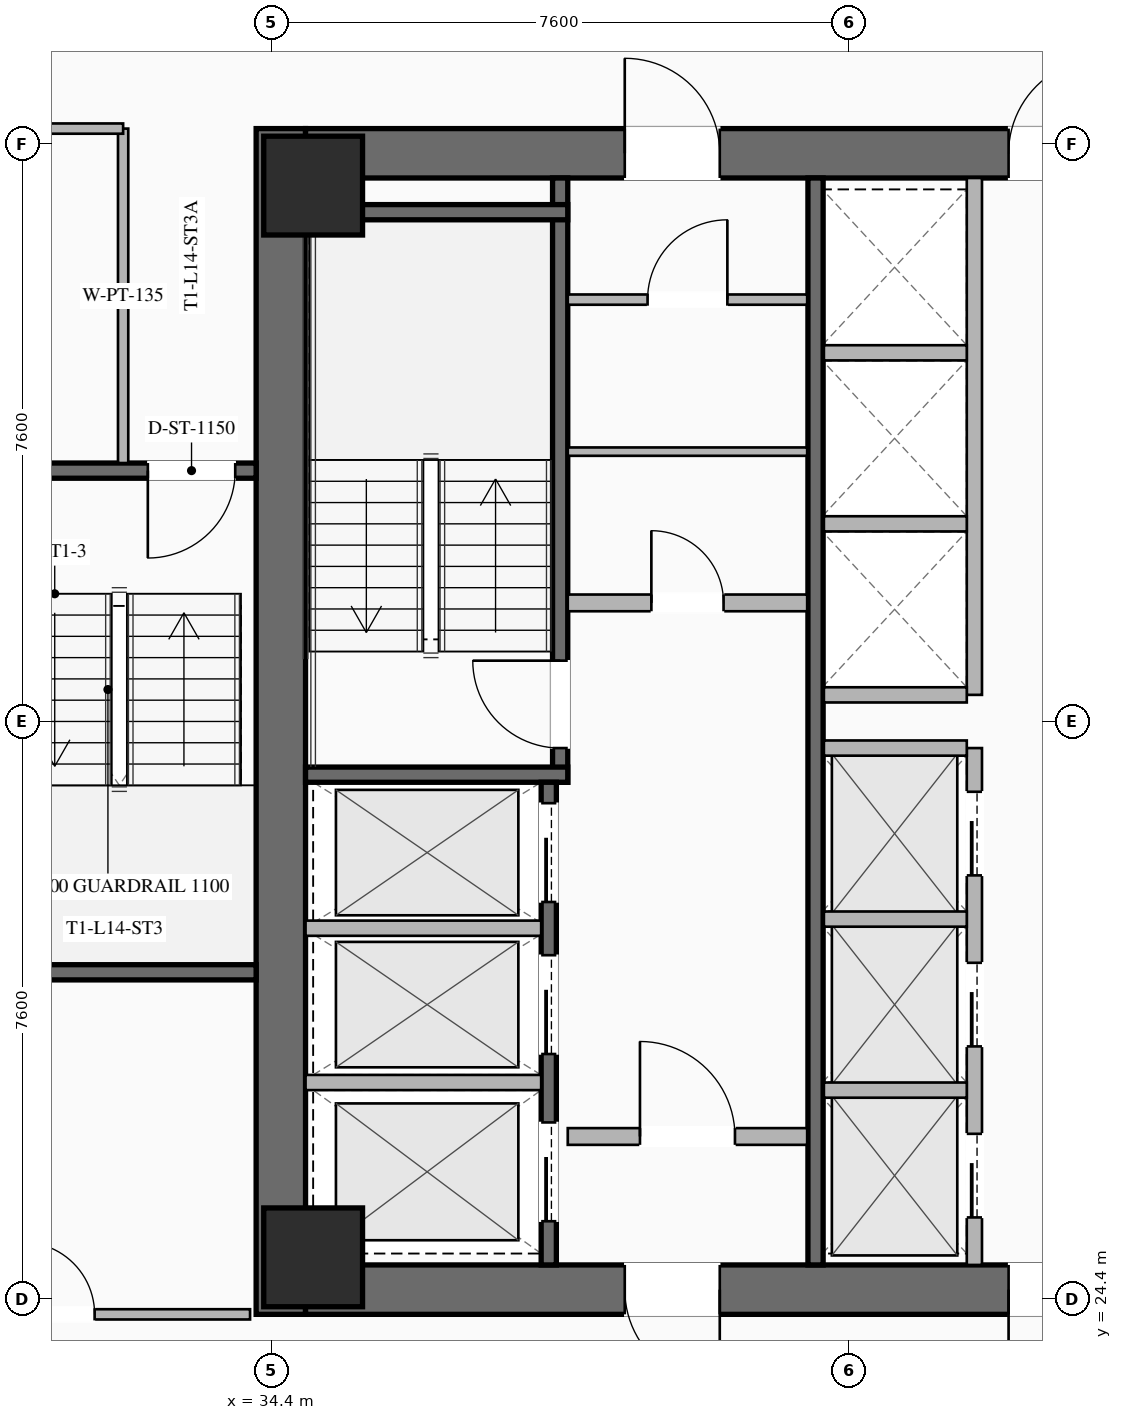
"""IFC4 building model, lengths in metres.
Left out: names, types, materials, properties, quantities, classifications, styles, units other than length and angle.
Written with IfcOpenShell. Run it as: python <this file> out.ifc"""

import sys

from ifc_helpers import new_model, si_unit, direction, frame, frame_2d, origin, origin_2d, place, context, subcontext, project, spatial, rectangle, hollow_rectangle, extrude, element, fill, save


model = new_model("IFC4")
c1 = context("Model", 3, precision=1e-05, world=origin(), true_north=direction((0.0, 1.0)))
c2 = subcontext(c1, "Body", "Model", "MODEL_VIEW")
j1 = project(units=[si_unit("LENGTHUNIT", "METRE"), si_unit("PLANEANGLEUNIT", "RADIAN")], contexts=[c1])
p1 = place(None, origin())
s1 = spatial("IfcSite", under=j1, at=p1, CompositionType="ELEMENT")
p2 = place(p1, origin())
s2 = spatial("IfcBuilding", under=s1, at=p2, CompositionType="ELEMENT")
p3 = place(p2, frame((0.0, 0.0, 56.55)))
s3 = spatial("IfcBuildingStorey", under=s2, at=p3, CompositionType="ELEMENT", Elevation=56.55)
p4 = place(p3, frame((34.525, 24.2, 0.0), z_axis=(0.0, 0.0, 1.0), x_axis=(0.0, 1.0, 0.0)))
e1 = element("IfcWall", 1, at=p4, inside=s3, PredefinedType="SHEAR", context=c2, shape_type="SweptSolid", body=[
    extrude(rectangle(XDim=15.6, YDim=0.65, at=frame_2d((7.8, 0.0))), origin(), (0.0, 0.0, 1.0), 3.55),
])
p5 = place(p3, frame((49.15, 24.525, 0.0), z_axis=(0.0, 0.0, 1.0), x_axis=(-1.0, 0.0, 0.0)))
e2 = element("IfcWall", 2, at=p5, inside=s3, PredefinedType="SHEAR", context=c2, shape_type="SweptSolid", body=[
    extrude(rectangle(XDim=14.3, YDim=0.65, at=frame_2d((7.15, 0.0))), origin(), (0.0, 0.0, 1.0), 3.55),
])
p6 = place(p5, frame((8.85, 0.0, 0.0)))
e3 = element("IfcOpeningElement", 3, at=p6, cuts=e2, PredefinedType="OPENING", context=c2, shape_type="SweptSolid", body=[
    extrude(rectangle(XDim=1.25, YDim=2.25, at=frame_2d((0.625, 1.125))), frame((0.0, 0.335, 0.0), z_axis=(0.0, -1.0, 0.0), x_axis=(1.0, 0.0, 0.0)), (0.0, 0.0, 1.0), 0.67),
])
p7 = place(p5, frame((3.8, 0.0, 0.0)))
e4 = element("IfcOpeningElement", 4, at=p7, cuts=e2, PredefinedType="OPENING", context=c2, shape_type="SweptSolid", body=[
    extrude(rectangle(XDim=1.25, YDim=2.25, at=frame_2d((0.625, 1.125))), frame((0.0, 0.335, 0.0), z_axis=(0.0, -1.0, 0.0), x_axis=(1.0, 0.0, 0.0)), (0.0, 0.0, 1.0), 0.67),
])
p8 = place(p3, frame((34.85, 39.475, 0.0), z_axis=(0.0, 0.0, 1.0), x_axis=(1.0, 0.0, 0.0)))
e5 = element("IfcWall", 5, at=p8, inside=s3, PredefinedType="SHEAR", context=c2, shape_type="SweptSolid", body=[
    extrude(rectangle(XDim=14.3, YDim=0.65, at=frame_2d((7.15, 0.0))), origin(), (0.0, 0.0, 1.0), 3.55),
])
p9 = place(p8, frame((4.2, 0.0, 0.0)))
e6 = element("IfcOpeningElement", 6, at=p9, cuts=e5, PredefinedType="OPENING", context=c2, shape_type="SweptSolid", body=[
    extrude(rectangle(XDim=1.25, YDim=2.25, at=frame_2d((0.625, 1.125))), frame((0.0, 0.335, 0.0), z_axis=(0.0, -1.0, 0.0), x_axis=(1.0, 0.0, 0.0)), (0.0, 0.0, 1.0), 0.67),
])
p10 = place(p8, frame((9.25, 0.0, 0.0)))
e7 = element("IfcOpeningElement", 7, at=p10, cuts=e5, PredefinedType="OPENING", context=c2, shape_type="SweptSolid", body=[
    extrude(rectangle(XDim=1.25, YDim=2.25, at=frame_2d((0.625, 1.125))), frame((0.0, 0.335, 0.0), z_axis=(0.0, -1.0, 0.0), x_axis=(1.0, 0.0, 0.0)), (0.0, 0.0, 1.0), 0.67),
])
for number, where, z_axis, x_axis in (
    (8, (34.95, 24.95, 0.0), (0.0, 0.0, 1.0), (1.0, 0.0, 0.0)),
    (9, (34.95, 39.05, 0.0), (0.0, 0.0, 1.0), (1.0, 0.0, 0.0)),
):
    element("IfcColumn", number, at=place(p3, frame(where, z_axis=z_axis, x_axis=x_axis)), inside=s3, PredefinedType="COLUMN", context=c2, shape_type="SweptSolid", body=[
        extrude(hollow_rectangle(XDim=1.3, YDim=1.3, WallThickness=0.05, at=origin_2d()), origin(), (0.0, 0.0, 1.0), 3.35),
    ])
p11 = place(p3, frame((38.2, 31.2, 0.0), z_axis=(0.0, 0.0, 1.0), x_axis=(0.0, 1.0, 0.0)))
e10 = element("IfcWall", 10, at=p11, inside=s3, PredefinedType="SHEAR", context=c2, shape_type="SweptSolid", body=[
    extrude(rectangle(XDim=7.95, YDim=0.2, at=frame_2d((3.975, 0.0))), origin(), (0.0, 0.0, 1.0), 3.35),
])
p12 = place(p11, frame((0.45, 0.0, 0.0)))
e11 = element("IfcOpeningElement", 11, at=p12, cuts=e10, PredefinedType="OPENING", context=c2, shape_type="SweptSolid", body=[
    extrude(rectangle(XDim=1.15, YDim=2.2, at=frame_2d((0.575, 1.1))), frame((0.0, 0.11, 0.0), z_axis=(0.0, -1.0, 0.0), x_axis=(1.0, 0.0, 0.0)), (0.0, 0.0, 1.0), 0.22),
])
for number, where, z_axis, x_axis in (
    (12, (34.85, 31.3, 0.0), (0.0, 0.0, 1.0), (1.0, 0.0, 0.0)),
    (13, (34.85, 38.7, 0.0), (0.0, 0.0, 1.0), (1.0, 0.0, 0.0)),
):
    element("IfcWall", number, at=place(p3, frame(where, z_axis=z_axis, x_axis=x_axis)), inside=s3, PredefinedType="SHEAR", context=c2, shape_type="SweptSolid", body=[
        extrude(rectangle(XDim=3.45, YDim=0.2, at=frame_2d((1.725, 0.0))), origin(), (0.0, 0.0, 1.0), 3.35),
    ])
p13 = place(p3, frame((41.56, 24.85, 0.0), z_axis=(0.0, 0.0, 1.0), x_axis=(0.0, 1.0, 0.0)))
e14 = element("IfcWall", 14, at=p13, inside=s3, PredefinedType="SHEAR", context=c2, shape_type="SweptSolid", body=[
    extrude(rectangle(XDim=14.3, YDim=0.2, at=frame_2d((7.15, 0.0))), origin(), (0.0, 0.0, 1.0), 3.35),
])
p14 = place(p3, frame((38.3, 33.56, 0.0), z_axis=(0.0, 0.0, 1.0), x_axis=(1.0, 0.0, 0.0)))
e15 = element("IfcWall", 15, at=p14, inside=s3, PredefinedType="SOLIDWALL", context=c2, shape_type="SweptSolid", body=[
    extrude(rectangle(XDim=3.15, YDim=0.22, at=frame_2d((1.575, 0.0))), origin(), (0.0, 0.0, 1.0), 2.703),
])
p15 = place(p14, frame((1.1, 0.0, 0.0)))
e16 = element("IfcOpeningElement", 16, at=p15, cuts=e15, PredefinedType="OPENING", context=c2, shape_type="SweptSolid", body=[
    extrude(rectangle(XDim=0.95, YDim=2.05, at=frame_2d((0.475, 1.025))), frame((0.0, 0.12, 0.0), z_axis=(0.0, -1.0, 0.0), x_axis=(1.0, 0.0, 0.0)), (0.0, 0.0, 1.0), 0.24),
])
p16 = place(p3, frame((38.3, 26.54, 0.0), z_axis=(0.0, 0.0, 1.0), x_axis=(1.0, 0.0, 0.0)))
e17 = element("IfcWall", 17, at=p16, inside=s3, PredefinedType="SOLIDWALL", context=c2, shape_type="SweptSolid", body=[
    extrude(rectangle(XDim=3.15, YDim=0.22, at=frame_2d((1.575, 0.0))), origin(), (0.0, 0.0, 1.0), 2.703),
])
p17 = place(p16, frame((0.95, 0.0, 0.0)))
e18 = element("IfcOpeningElement", 18, at=p17, cuts=e17, PredefinedType="OPENING", context=c2, shape_type="SweptSolid", body=[
    extrude(rectangle(XDim=1.25, YDim=2.25, at=frame_2d((0.625, 1.125))), frame((0.0, 0.12, 0.0), z_axis=(0.0, -1.0, 0.0), x_axis=(1.0, 0.0, 0.0)), (0.0, 0.0, 1.0), 0.24),
])
p18 = place(p3, frame((38.05, 24.85, 0.0), z_axis=(0.0, 0.0, 1.0), x_axis=(0.0, 1.0, 0.0)))
e19 = element("IfcWall", 19, at=p18, inside=s3, PredefinedType="SHEAR", context=c2, shape_type="SweptSolid", body=[
    extrude(rectangle(XDim=6.35, YDim=0.2, at=frame_2d((3.175, 0.0))), origin(), (0.0, 0.0, 1.0), 3.35),
])
p19 = place(p18, frame((4.775, 0.0, 0.0)))
e20 = element("IfcOpeningElement", 20, at=p19, cuts=e19, PredefinedType="OPENING", context=c2, shape_type="SweptSolid", body=[
    extrude(rectangle(XDim=1.3, YDim=2.25, at=frame_2d((0.65, 1.125))), frame((0.0, 0.11, 0.0), z_axis=(0.0, -1.0, 0.0), x_axis=(1.0, 0.0, 0.0)), (0.0, 0.0, 1.0), 0.22),
])
p20 = place(p18, frame((2.775, 0.0, 0.0)))
e21 = element("IfcOpeningElement", 21, at=p20, cuts=e19, PredefinedType="OPENING", context=c2, shape_type="SweptSolid", body=[
    extrude(rectangle(XDim=1.3, YDim=2.25, at=frame_2d((0.65, 1.125))), frame((0.0, 0.11, 0.0), z_axis=(0.0, -1.0, 0.0), x_axis=(1.0, 0.0, 0.0)), (0.0, 0.0, 1.0), 0.22),
])
p21 = place(p18, frame((0.575, 0.0, 0.0)))
e22 = element("IfcOpeningElement", 22, at=p21, cuts=e19, PredefinedType="OPENING", context=c2, shape_type="SweptSolid", body=[
    extrude(rectangle(XDim=1.3, YDim=2.25, at=frame_2d((0.65, 1.125))), frame((0.0, 0.11, 0.0), z_axis=(0.0, -1.0, 0.0), x_axis=(1.0, 0.0, 0.0)), (0.0, 0.0, 1.0), 0.22),
])
for number, where, z_axis, x_axis in (
    (23, (34.85, 27.25, 0.0), (0.0, 0.0, 1.0), (1.0, 0.0, 0.0)),
    (24, (34.85, 29.28, 0.0), (0.0, 0.0, 1.0), (1.0, 0.0, 0.0)),
):
    element("IfcWall", number, at=place(p3, frame(where, z_axis=z_axis, x_axis=x_axis)), inside=s3, PredefinedType="SOLIDWALL", context=c2, shape_type="SweptSolid", body=[
        extrude(rectangle(XDim=3.1, YDim=0.2, at=frame_2d((1.55, 0.0))), origin(), (0.0, 0.0, 1.0), 3.35),
    ])
p22 = place(p3, frame((38.3, 37.55, 0.0), z_axis=(0.0, 0.0, 1.0), x_axis=(1.0, 0.0, 0.0)))
e25 = element("IfcWall", 25, at=p22, inside=s3, PredefinedType="PARTITIONING", context=c2, shape_type="SweptSolid", body=[
    extrude(rectangle(XDim=3.15, YDim=0.135, at=frame_2d((1.575, 0.0))), origin(), (0.0, 0.0, 1.0), 2.703),
])
p23 = place(p22, frame((1.05, 0.0, 0.0)))
e26 = element("IfcOpeningElement", 26, at=p23, cuts=e25, PredefinedType="OPENING", context=c2, shape_type="SweptSolid", body=[
    extrude(rectangle(XDim=1.05, YDim=2.2, at=frame_2d((0.525, 1.1))), frame((0.0, 0.077, 0.0), z_axis=(0.0, -1.0, 0.0), x_axis=(1.0, 0.0, 0.0)), (0.0, 0.0, 1.0), 0.155),
])
p24 = place(p3, frame((38.3, 35.55, 0.0), z_axis=(0.0, 0.0, 1.0), x_axis=(1.0, 0.0, 0.0)))
e27 = element("IfcWall", 27, at=p24, inside=s3, PredefinedType="PARTITIONING", context=c2, shape_type="SweptSolid", body=[
    extrude(rectangle(XDim=3.15, YDim=0.11, at=frame_2d((1.575, 0.0))), origin(), (0.0, 0.0, 1.0), 2.703),
])
p25 = place(p3, frame((43.65, 24.85, 0.0), z_axis=(0.0, 0.0, 1.0), x_axis=(0.0, 1.0, 0.0)))
e28 = element("IfcWall", 28, at=p25, inside=s3, PredefinedType="SOLIDWALL", context=c2, shape_type="SweptSolid", body=[
    extrude(rectangle(XDim=6.8, YDim=0.2, at=frame_2d((3.4, 0.0))), origin(), (0.0, 0.0, 1.0), 3.35),
])
p26 = place(p25, frame((0.625, 0.0, 0.0)))
e29 = element("IfcOpeningElement", 29, at=p26, cuts=e28, PredefinedType="OPENING", context=c2, shape_type="SweptSolid", body=[
    extrude(rectangle(XDim=1.1, YDim=2.2, at=frame_2d((0.55, 1.1))), frame((0.0, 0.11, 0.0), z_axis=(0.0, -1.0, 0.0), x_axis=(1.0, 0.0, 0.0)), (0.0, 0.0, 1.0), 0.22),
])
p27 = place(p25, frame((2.875, 0.0, 0.0)))
e30 = element("IfcOpeningElement", 30, at=p27, cuts=e28, PredefinedType="OPENING", context=c2, shape_type="SweptSolid", body=[
    extrude(rectangle(XDim=1.1, YDim=2.2, at=frame_2d((0.55, 1.1))), frame((0.0, 0.11, 0.0), z_axis=(0.0, -1.0, 0.0), x_axis=(1.0, 0.0, 0.0)), (0.0, 0.0, 1.0), 0.22),
])
p28 = place(p25, frame((5.125, 0.0, 0.0)))
e31 = element("IfcOpeningElement", 31, at=p28, cuts=e28, PredefinedType="OPENING", context=c2, shape_type="SweptSolid", body=[
    extrude(rectangle(XDim=1.1, YDim=2.2, at=frame_2d((0.55, 1.1))), frame((0.0, 0.11, 0.0), z_axis=(0.0, -1.0, 0.0), x_axis=(1.0, 0.0, 0.0)), (0.0, 0.0, 1.0), 0.22),
])
for number, where, z_axis, x_axis in (
    (32, (41.67, 27.15, 0.0), (0.0, 0.0, 1.0), (1.0, 0.0, 0.0)),
    (33, (41.67, 29.4, 0.0), (0.0, 0.0, 1.0), (1.0, 0.0, 0.0)),
    (34, (41.67, 31.65, 0.0), (0.0, 0.0, 1.0), (1.0, 0.0, 0.0)),
):
    element("IfcWall", number, at=place(p3, frame(where, z_axis=z_axis, x_axis=x_axis)), inside=s3, PredefinedType="SOLIDWALL", context=c2, shape_type="SweptSolid", body=[
        extrude(rectangle(XDim=1.88, YDim=0.2, at=frame_2d((0.94, 0.0))), origin(), (0.0, 0.0, 1.0), 3.35),
    ])
p29 = place(p3, frame((43.65, 32.35, 0.0), z_axis=(0.0, 0.0, 1.0), x_axis=(0.0, 1.0, 0.0)))
e35 = element("IfcWall", 35, at=p29, inside=s3, PredefinedType="SOLIDWALL", context=c2, shape_type="SweptSolid", body=[
    extrude(rectangle(XDim=6.8, YDim=0.2, at=frame_2d((3.4, 0.0))), origin(), (0.0, 0.0, 1.0), 3.35),
])
for number, where, z_axis, x_axis in (
    (36, (41.67, 32.35, 0.0), (0.0, 0.0, 1.0), (1.0, 0.0, 0.0)),
    (37, (41.67, 34.6, 0.0), (0.0, 0.0, 1.0), (1.0, 0.0, 0.0)),
    (38, (41.67, 36.85, 0.0), (0.0, 0.0, 1.0), (1.0, 0.0, 0.0)),
):
    element("IfcWall", number, at=place(p3, frame(where, z_axis=z_axis, x_axis=x_axis)), inside=s3, PredefinedType="SOLIDWALL", context=c2, shape_type="SweptSolid", body=[
        extrude(rectangle(XDim=1.88, YDim=0.2, at=frame_2d((0.94, 0.0))), origin(), (0.0, 0.0, 1.0), 3.35),
    ])
p30 = place(p3, frame((34.2, 35.3, 0.0), z_axis=(0.0, 0.0, 1.0), x_axis=(-1.0, 0.0, 0.0)))
e39 = element("IfcWall", 39, at=p30, inside=s3, PredefinedType="SHEAR", context=c2, shape_type="SweptSolid", body=[
    extrude(rectangle(XDim=3.4, YDim=0.2, at=frame_2d((1.7, 0.0))), origin(), (0.0, 0.0, 1.0), 3.35),
])
p31 = place(p30, frame((0.275, 0.0, 0.0)))
e40 = element("IfcOpeningElement", 40, at=p31, cuts=e39, PredefinedType="OPENING", context=c2, shape_type="SweptSolid", body=[
    extrude(rectangle(XDim=1.15, YDim=2.2, at=frame_2d((0.575, 1.1))), frame((0.0, 0.11, 0.0), z_axis=(0.0, -1.0, 0.0), x_axis=(1.0, 0.0, 0.0)), (0.0, 0.0, 1.0), 0.22),
])
p32 = place(p3, frame((30.8, 28.7, 0.0), z_axis=(0.0, 0.0, 1.0), x_axis=(1.0, 0.0, 0.0)))
e41 = element("IfcWall", 41, at=p32, inside=s3, PredefinedType="SHEAR", context=c2, shape_type="SweptSolid", body=[
    extrude(rectangle(XDim=3.4, YDim=0.2, at=frame_2d((1.7, 0.0))), origin(), (0.0, 0.0, 1.0), 3.35),
])
p33 = place(p3, frame((32.45, 35.4, 0.0), z_axis=(0.0, 0.0, 1.0), x_axis=(0.0, 1.0, 0.0)))
e42 = element("IfcWall", 42, at=p33, inside=s3, PredefinedType="PARTITIONING", context=c2, shape_type="SweptSolid", body=[
    extrude(rectangle(XDim=4.4, YDim=0.135, at=frame_2d((2.2, 0.0))), origin(), (0.0, 0.0, 1.0), 2.703),
])
p34 = place(p3, frame((32.45, 39.8, 0.0), z_axis=(0.0, 0.0, 1.0), x_axis=(-1.0, 0.0, 0.0)))
e43 = element("IfcWall", 43, at=p34, inside=s3, PredefinedType="PARTITIONING", context=c2, shape_type="SweptSolid", body=[
    extrude(rectangle(XDim=13.33, YDim=0.135, at=frame_2d((6.665, 0.0))), origin(), (0.0, 0.0, 1.0), 2.703),
])
p35 = place(p34, frame((5.84, 0.0, 0.0)))
e44 = element("IfcOpeningElement", 44, at=p35, cuts=e43, PredefinedType="OPENING", context=c2, shape_type="SweptSolid", body=[
    extrude(rectangle(XDim=0.95, YDim=2.05, at=frame_2d((0.475, 1.025))), frame((0.0, 0.077, 0.0), z_axis=(0.0, -1.0, 0.0), x_axis=(1.0, 0.0, 0.0)), (0.0, 0.0, 1.0), 0.155),
])
p36 = place(p3, frame((19.12, 24.2, 0.0), z_axis=(0.0, 0.0, 1.0), x_axis=(1.0, 0.0, 0.0)))
e45 = element("IfcWall", 45, at=p36, inside=s3, PredefinedType="PARTITIONING", context=c2, shape_type="SweptSolid", body=[
    extrude(rectangle(XDim=15.0, YDim=0.135, at=frame_2d((7.5, 0.0))), origin(), (0.0, 0.0, 1.0), 2.703),
])
p37 = place(p36, frame((12.005, 0.0, 0.0)))
e46 = element("IfcOpeningElement", 46, at=p37, cuts=e45, PredefinedType="OPENING", context=c2, shape_type="SweptSolid", body=[
    extrude(rectangle(XDim=0.95, YDim=2.05, at=frame_2d((0.475, 1.025))), frame((0.0, 0.077, 0.0), z_axis=(0.0, -1.0, 0.0), x_axis=(1.0, 0.0, 0.0)), (0.0, 0.0, 1.0), 0.155),
])
p38 = place(p9, origin())
e47 = element("IfcDoor", 47, at=p38, inside=s3, OperationType="SINGLE_SWING_LEFT", PredefinedType="DOOR", context=c2, shape_type="SweptSolid", body=[
    extrude(rectangle(XDim=1.25, YDim=2.25, at=frame_2d((0.625, 1.125))), frame((0.0, 0.025, 0.0), z_axis=(0.0, -1.0, 0.0), x_axis=(1.0, 0.0, 0.0)), (0.0, 0.0, 1.0), 0.05),
])
fill(e6, e47)
p39 = place(p10, origin())
e48 = element("IfcDoor", 48, at=p39, inside=s3, OperationType="SINGLE_SWING_RIGHT", PredefinedType="DOOR", context=c2, shape_type="SweptSolid", body=[
    extrude(rectangle(XDim=1.25, YDim=2.25, at=frame_2d((0.625, 1.125))), frame((0.0, 0.025, 0.0), z_axis=(0.0, -1.0, 0.0), x_axis=(1.0, 0.0, 0.0)), (0.0, 0.0, 1.0), 0.05),
])
fill(e7, e48)
p40 = place(p6, origin())
e49 = element("IfcDoor", 49, at=p40, inside=s3, OperationType="SINGLE_SWING_LEFT", PredefinedType="DOOR", context=c2, shape_type="SweptSolid", body=[
    extrude(rectangle(XDim=1.25, YDim=2.25, at=frame_2d((0.625, 1.125))), frame((0.0, 0.025, 0.0), z_axis=(0.0, -1.0, 0.0), x_axis=(1.0, 0.0, 0.0)), (0.0, 0.0, 1.0), 0.05),
])
fill(e3, e49)
p41 = place(p7, origin())
e50 = element("IfcDoor", 50, at=p41, inside=s3, OperationType="SINGLE_SWING_RIGHT", PredefinedType="DOOR", context=c2, shape_type="SweptSolid", body=[
    extrude(rectangle(XDim=1.25, YDim=2.25, at=frame_2d((0.625, 1.125))), frame((0.0, 0.025, 0.0), z_axis=(0.0, -1.0, 0.0), x_axis=(1.0, 0.0, 0.0)), (0.0, 0.0, 1.0), 0.05),
])
fill(e4, e50)
p42 = place(p12, origin())
e51 = element("IfcDoor", 51, at=p42, inside=s3, OperationType="SINGLE_SWING_RIGHT", PredefinedType="DOOR", context=c2, shape_type="SweptSolid", body=[
    extrude(rectangle(XDim=1.15, YDim=2.2, at=frame_2d((0.575, 1.1))), frame((0.0, 0.025, 0.0), z_axis=(0.0, -1.0, 0.0), x_axis=(1.0, 0.0, 0.0)), (0.0, 0.0, 1.0), 0.05),
])
fill(e11, e51)
p43 = place(p17, origin())
e52 = element("IfcDoor", 52, at=p43, inside=s3, OperationType="SINGLE_SWING_LEFT", PredefinedType="DOOR", context=c2, shape_type="SweptSolid", body=[
    extrude(rectangle(XDim=1.25, YDim=2.25, at=frame_2d((0.625, 1.125))), frame((0.0, 0.025, 0.0), z_axis=(0.0, -1.0, 0.0), x_axis=(1.0, 0.0, 0.0)), (0.0, 0.0, 1.0), 0.05),
])
fill(e18, e52)
p44 = place(p23, origin())
e53 = element("IfcDoor", 53, at=p44, inside=s3, OperationType="SINGLE_SWING_RIGHT", PredefinedType="DOOR", context=c2, shape_type="SweptSolid", body=[
    extrude(rectangle(XDim=1.05, YDim=2.2, at=frame_2d((0.525, 1.1))), frame((0.0, 0.025, 0.0), z_axis=(0.0, -1.0, 0.0), x_axis=(1.0, 0.0, 0.0)), (0.0, 0.0, 1.0), 0.05),
])
fill(e26, e53)
p45 = place(p15, origin())
e54 = element("IfcDoor", 54, at=p45, inside=s3, OperationType="SINGLE_SWING_LEFT", PredefinedType="DOOR", context=c2, shape_type="SweptSolid", body=[
    extrude(rectangle(XDim=0.95, YDim=2.05, at=frame_2d((0.475, 1.025))), frame((0.0, 0.025, 0.0), z_axis=(0.0, -1.0, 0.0), x_axis=(1.0, 0.0, 0.0)), (0.0, 0.0, 1.0), 0.05),
])
fill(e16, e54)
p46 = place(p31, origin())
e55 = element("IfcDoor", 55, at=p46, inside=s3, OperationType="SINGLE_SWING_RIGHT", PredefinedType="DOOR", context=c2, shape_type="SweptSolid", body=[
    extrude(rectangle(XDim=1.15, YDim=2.2, at=frame_2d((0.575, 1.1))), frame((0.0, 0.025, 0.0), z_axis=(0.0, -1.0, 0.0), x_axis=(1.0, 0.0, 0.0)), (0.0, 0.0, 1.0), 0.05),
])
fill(e40, e55)
p47 = place(p37, origin())
e56 = element("IfcDoor", 56, at=p47, inside=s3, OperationType="SINGLE_SWING_LEFT", PredefinedType="DOOR", context=c2, shape_type="SweptSolid", body=[
    extrude(rectangle(XDim=0.95, YDim=2.05, at=frame_2d((0.475, 1.025))), frame((0.0, 0.025, 0.0), z_axis=(0.0, -1.0, 0.0), x_axis=(1.0, 0.0, 0.0)), (0.0, 0.0, 1.0), 0.05),
])
fill(e46, e56)
p48 = place(p19, origin())
e57 = element("IfcDoor", 57, at=p48, inside=s3, OperationType="SLIDING_TO_LEFT", PredefinedType="DOOR", context=c2, shape_type="SweptSolid", body=[
    extrude(rectangle(XDim=1.3, YDim=2.25, at=frame_2d((0.65, 1.125))), frame((0.0, 0.025, 0.0), z_axis=(0.0, -1.0, 0.0), x_axis=(1.0, 0.0, 0.0)), (0.0, 0.0, 1.0), 0.05),
])
fill(e20, e57)
p49 = place(p20, origin())
e58 = element("IfcDoor", 58, at=p49, inside=s3, OperationType="SLIDING_TO_LEFT", PredefinedType="DOOR", context=c2, shape_type="SweptSolid", body=[
    extrude(rectangle(XDim=1.3, YDim=2.25, at=frame_2d((0.65, 1.125))), frame((0.0, 0.025, 0.0), z_axis=(0.0, -1.0, 0.0), x_axis=(1.0, 0.0, 0.0)), (0.0, 0.0, 1.0), 0.05),
])
fill(e21, e58)
p50 = place(p21, origin())
e59 = element("IfcDoor", 59, at=p50, inside=s3, OperationType="SLIDING_TO_LEFT", PredefinedType="DOOR", context=c2, shape_type="SweptSolid", body=[
    extrude(rectangle(XDim=1.3, YDim=2.25, at=frame_2d((0.65, 1.125))), frame((0.0, 0.025, 0.0), z_axis=(0.0, -1.0, 0.0), x_axis=(1.0, 0.0, 0.0)), (0.0, 0.0, 1.0), 0.05),
])
fill(e22, e59)
p51 = place(p26, origin())
e60 = element("IfcDoor", 60, at=p51, inside=s3, OperationType="SLIDING_TO_LEFT", PredefinedType="DOOR", context=c2, shape_type="SweptSolid", body=[
    extrude(rectangle(XDim=1.1, YDim=2.2, at=frame_2d((0.55, 1.1))), frame((0.0, 0.025, 0.0), z_axis=(0.0, -1.0, 0.0), x_axis=(1.0, 0.0, 0.0)), (0.0, 0.0, 1.0), 0.05),
])
fill(e29, e60)
p52 = place(p27, origin())
e61 = element("IfcDoor", 61, at=p52, inside=s3, OperationType="SLIDING_TO_LEFT", PredefinedType="DOOR", context=c2, shape_type="SweptSolid", body=[
    extrude(rectangle(XDim=1.1, YDim=2.2, at=frame_2d((0.55, 1.1))), frame((0.0, 0.025, 0.0), z_axis=(0.0, -1.0, 0.0), x_axis=(1.0, 0.0, 0.0)), (0.0, 0.0, 1.0), 0.05),
])
fill(e30, e61)
p53 = place(p28, origin())
e62 = element("IfcDoor", 62, at=p53, inside=s3, OperationType="SLIDING_TO_LEFT", PredefinedType="DOOR", context=c2, shape_type="SweptSolid", body=[
    extrude(rectangle(XDim=1.1, YDim=2.2, at=frame_2d((0.55, 1.1))), frame((0.0, 0.025, 0.0), z_axis=(0.0, -1.0, 0.0), x_axis=(1.0, 0.0, 0.0)), (0.0, 0.0, 1.0), 0.05),
])
fill(e31, e62)
save(model, sys.argv[1])
